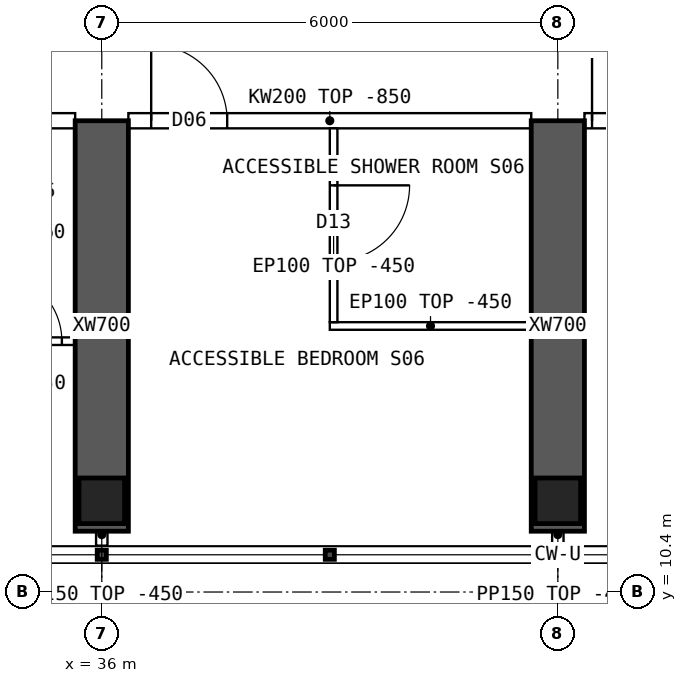
"""IFC4 building model, lengths in metres.
Left out: names, types, materials, properties, quantities, classifications, styles, units other than length and angle.
Written with IfcOpenShell. Run it as: python <this file> out.ifc"""

import sys

from ifc_helpers import new_model, si_unit, direction, frame, frame_2d, origin, origin_2d, place, context, subcontext, project, spatial, polyline, rectangle, hollow_rectangle, outline, extrude, element, fill, save


model = new_model("IFC4")
c1 = context("Model", 3, precision=1e-05, world=origin(), true_north=direction((0.0, 1.0)))
c2 = subcontext(c1, "Body", "Model", "MODEL_VIEW")
j1 = project(units=[si_unit("LENGTHUNIT", "METRE"), si_unit("PLANEANGLEUNIT", "RADIAN")], contexts=[c1])
p1 = place(None, origin())
s1 = spatial("IfcSite", under=j1, at=p1, CompositionType="ELEMENT")
p2 = place(p1, origin())
s2 = spatial("IfcBuilding", under=s1, at=p2, CompositionType="ELEMENT")
p3 = place(p2, frame((0.0, 0.0, 242.8)))
s3 = spatial("IfcBuildingStorey", under=s2, at=p3, CompositionType="ELEMENT", Elevation=242.8)
for number, where, z_axis, x_axis in (
    (1, (36.0, 11.6, 0.0), (0.0, 0.0, 1.0), (1.0, 0.0, 0.0)),
    (2, (42.0, 11.6, 0.0), (0.0, 0.0, 1.0), (1.0, 0.0, 0.0)),
):
    element("IfcColumn", number, at=place(p3, frame(where, z_axis=z_axis, x_axis=x_axis)), inside=s3, PredefinedType="COLUMN", context=c2, shape_type="SweptSolid", body=[
        extrude(hollow_rectangle(XDim=0.6, YDim=0.6, WallThickness=0.06, at=origin_2d()), origin(), (0.0, 0.0, 1.0), 3.75),
    ])
for number, where, z_axis, x_axis in (
    (3, (36.0, 11.2, 0.0), (0.0, 0.0, 1.0), (0.0, 1.0, 0.0)),
    (4, (42.0, 11.2, 0.0), (0.0, 0.0, 1.0), (0.0, 1.0, 0.0)),
):
    element("IfcWall", number, at=place(p3, frame(where, z_axis=z_axis, x_axis=x_axis)), inside=s3, PredefinedType="SHEAR", context=c2, shape_type="SweptSolid", body=[
        extrude(rectangle(XDim=5.4, YDim=0.7, at=frame_2d((2.7, 0.0))), origin(), (0.0, 0.0, 1.0), 3.75),
    ])
p4 = place(p3, frame((30.35, 16.6, 0.0), z_axis=(0.0, 0.0, 1.0), x_axis=(1.0, 0.0, 0.0)))
e5 = element("IfcWall", 5, at=p4, inside=s3, PredefinedType="SOLIDWALL", context=c2, shape_type="SweptSolid", body=[
    extrude(outline(polyline([(0.0, 0.0), (5.3, 0.0), (5.3, 2.9), (0.0, 2.9), (0.0, 0.0)])), frame((0.0, 0.1, 0.0), z_axis=(0.0, -1.0, 0.0), x_axis=(1.0, 0.0, 0.0)), (0.0, 0.0, 1.0), 0.2),
])
p5 = place(p4, frame((0.3, 0.0, 0.0)))
e6 = element("IfcOpeningElement", 6, at=p5, cuts=e5, PredefinedType="OPENING", context=c2, shape_type="SweptSolid", body=[
    extrude(rectangle(XDim=0.9, YDim=2.1, at=frame_2d((0.45, 1.05))), frame((0.0, 0.11, 0.0), z_axis=(0.0, -1.0, 0.0), x_axis=(1.0, 0.0, 0.0)), (0.0, 0.0, 1.0), 0.22),
])
p6 = place(p3, frame((36.35, 16.6, 0.0), z_axis=(0.0, 0.0, 1.0), x_axis=(1.0, 0.0, 0.0)))
e7 = element("IfcWall", 7, at=p6, inside=s3, PredefinedType="SOLIDWALL", context=c2, shape_type="SweptSolid", body=[
    extrude(outline(polyline([(0.0, 0.0), (5.3, 0.0), (5.3, 2.9), (0.0, 2.9), (0.0, 0.0)])), frame((0.0, 0.1, 0.0), z_axis=(0.0, -1.0, 0.0), x_axis=(1.0, 0.0, 0.0)), (0.0, 0.0, 1.0), 0.2),
])
p7 = place(p6, frame((0.3, 0.0, 0.0)))
e8 = element("IfcOpeningElement", 8, at=p7, cuts=e7, PredefinedType="OPENING", context=c2, shape_type="SweptSolid", body=[
    extrude(rectangle(XDim=1.0, YDim=2.1, at=frame_2d((0.5, 1.05))), frame((0.0, 0.11, 0.0), z_axis=(0.0, -1.0, 0.0), x_axis=(1.0, 0.0, 0.0)), (0.0, 0.0, 1.0), 0.22),
])
p8 = place(p3, frame((42.35, 16.6, 0.0), z_axis=(0.0, 0.0, 1.0), x_axis=(1.0, 0.0, 0.0)))
e9 = element("IfcWall", 9, at=p8, inside=s3, PredefinedType="SOLIDWALL", context=c2, shape_type="SweptSolid", body=[
    extrude(outline(polyline([(0.0, 0.0), (5.3, 0.0), (5.3, 2.9), (0.0, 2.9), (0.0, 0.0)])), frame((0.0, 0.1, 0.0), z_axis=(0.0, -1.0, 0.0), x_axis=(1.0, 0.0, 0.0)), (0.0, 0.0, 1.0), 0.2),
])
p9 = place(p8, frame((0.1, 0.0, 0.0)))
e10 = element("IfcOpeningElement", 10, at=p9, cuts=e9, PredefinedType="OPENING", context=c2, shape_type="SweptSolid", body=[
    extrude(rectangle(XDim=0.9, YDim=2.1, at=frame_2d((0.45, 1.05))), frame((0.0, 0.11, 0.0), z_axis=(0.0, -1.0, 0.0), x_axis=(1.0, 0.0, 0.0)), (0.0, 0.0, 1.0), 0.22),
])
p10 = place(p3, frame((35.65, 13.7, 0.0), z_axis=(0.0, 0.0, 1.0), x_axis=(-1.0, 0.0, 0.0)))
e11 = element("IfcWall", 11, at=p10, inside=s3, PredefinedType="PARTITIONING", context=c2, shape_type="SweptSolid", body=[
    extrude(rectangle(XDim=1.25, YDim=0.1, at=frame_2d((0.625, 0.0))), origin(), (0.0, 0.0, 1.0), 3.3),
])
p11 = place(p10, frame((0.175, 0.0, 0.0)))
e12 = element("IfcOpeningElement", 12, at=p11, cuts=e11, PredefinedType="OPENING", context=c2, shape_type="SweptSolid", body=[
    extrude(rectangle(XDim=0.9, YDim=2.1, at=frame_2d((0.45, 1.05))), frame((0.0, 0.06, 0.0), z_axis=(0.0, -1.0, 0.0), x_axis=(1.0, 0.0, 0.0)), (0.0, 0.0, 1.0), 0.12),
])
p12 = place(p3, frame((39.0, 13.9, 0.0), z_axis=(0.0, 0.0, 1.0), x_axis=(1.0, 0.0, 0.0)))
e13 = element("IfcWall", 13, at=p12, inside=s3, PredefinedType="PARTITIONING", context=c2, shape_type="SweptSolid", body=[
    extrude(rectangle(XDim=2.65, YDim=0.1, at=frame_2d((1.325, 0.0))), origin(), (0.0, 0.0, 1.0), 3.3),
])
p13 = place(p3, frame((39.05, 13.95, 0.0), z_axis=(0.0, 0.0, 1.0), x_axis=(0.0, 1.0, 0.0)))
e14 = element("IfcWall", 14, at=p13, inside=s3, PredefinedType="PARTITIONING", context=c2, shape_type="SweptSolid", body=[
    extrude(outline(polyline([(0.0, 0.0), (2.55, 0.0), (2.55, 2.9), (2.502, 2.9), (2.5, 3.3), (0.0, 3.3), (0.0, 0.0)])), frame((0.0, 0.05, 0.0), z_axis=(0.0, -1.0, 0.0), x_axis=(1.0, 0.0, 0.0)), (0.0, 0.0, 1.0), 0.1),
])
p14 = place(p13, frame((0.8, 0.0, 0.0)))
e15 = element("IfcOpeningElement", 15, at=p14, cuts=e14, PredefinedType="OPENING", context=c2, shape_type="SweptSolid", body=[
    extrude(rectangle(XDim=1.0, YDim=2.1, at=frame_2d((0.5, 1.05))), frame((0.0, 0.06, 0.0), z_axis=(0.0, -1.0, 0.0), x_axis=(1.0, 0.0, 0.0)), (0.0, 0.0, 1.0), 0.12),
])
for number, where, z_axis, x_axis in (
    (16, (36.0, 11.3, 0.0), (0.0, 0.0, 1.0), (0.0, -1.0, 0.0)),
    (17, (42.0, 11.3, 0.0), (0.0, 0.0, 1.0), (0.0, -1.0, 0.0)),
):
    element("IfcWall", number, at=place(p3, frame(where, z_axis=z_axis, x_axis=x_axis)), inside=s3, PredefinedType="PARTITIONING", context=c2, shape_type="SweptSolid", body=[
        extrude(rectangle(XDim=0.29, YDim=0.15, at=frame_2d((0.145, 0.0))), origin(), (0.0, 0.0, 1.0), 3.3),
    ])
p15 = place(p11, origin())
e18 = element("IfcDoor", 18, at=p15, inside=s3, OperationType="SINGLE_SWING_RIGHT", PredefinedType="DOOR", context=c2, shape_type="SweptSolid", body=[
    extrude(rectangle(XDim=0.9, YDim=2.1, at=frame_2d((0.45, 1.05))), frame((0.0, 0.025, 0.0), z_axis=(0.0, -1.0, 0.0), x_axis=(1.0, 0.0, 0.0)), (0.0, 0.0, 1.0), 0.05),
])
fill(e12, e18)
p16 = place(p14, origin())
e19 = element("IfcDoor", 19, at=p16, inside=s3, OperationType="SINGLE_SWING_RIGHT", PredefinedType="DOOR", context=c2, shape_type="SweptSolid", body=[
    extrude(rectangle(XDim=1.0, YDim=2.1, at=frame_2d((0.5, 1.05))), frame((0.0, 0.025, 0.0), z_axis=(0.0, -1.0, 0.0), x_axis=(1.0, 0.0, 0.0)), (0.0, 0.0, 1.0), 0.05),
])
fill(e15, e19)
p17 = place(p7, origin())
e20 = element("IfcDoor", 20, at=p17, inside=s3, OperationType="SINGLE_SWING_LEFT", PredefinedType="DOOR", context=c2, shape_type="SweptSolid", body=[
    extrude(rectangle(XDim=1.0, YDim=2.1, at=frame_2d((0.5, 1.05))), frame((0.0, 0.025, 0.0), z_axis=(0.0, -1.0, 0.0), x_axis=(1.0, 0.0, 0.0)), (0.0, 0.0, 1.0), 0.05),
])
fill(e8, e20)
p18 = place(p9, origin())
e21 = element("IfcDoor", 21, at=p18, inside=s3, OperationType="SINGLE_SWING_LEFT", PredefinedType="DOOR", context=c2, shape_type="SweptSolid", body=[
    extrude(rectangle(XDim=0.9, YDim=2.1, at=frame_2d((0.45, 1.05))), frame((0.0, 0.025, 0.0), z_axis=(0.0, -1.0, 0.0), x_axis=(1.0, 0.0, 0.0)), (0.0, 0.0, 1.0), 0.05),
])
fill(e10, e21)
save(model, sys.argv[1])
